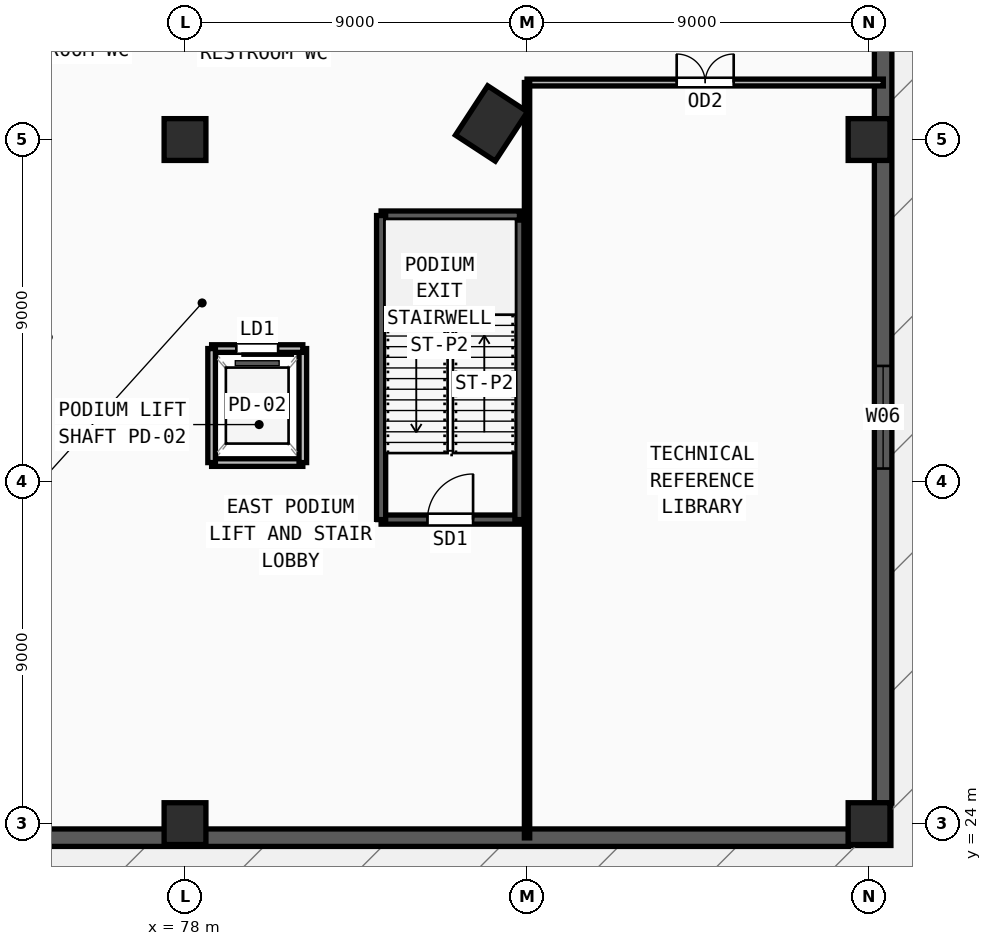
"""IFC4 building model, lengths in metres.
Left out: names, types, materials, properties, quantities, classifications, styles, units other than length and angle.
Written with IfcOpenShell. Run it as: python <this file> out.ifc"""

import sys

from ifc_helpers import new_model, si_unit, direction, frame, frame_2d, origin, origin_2d, place, context, subcontext, project, spatial, rectangle, extrude, source, transform, mapped, element, fill, save


model = new_model("IFC4")
c1 = context("Model", 3, precision=1e-05, world=origin(), true_north=direction((0.0, 1.0)))
c2 = subcontext(c1, "Body", "Model", "MODEL_VIEW")
j1 = project(units=[si_unit("LENGTHUNIT", "METRE"), si_unit("PLANEANGLEUNIT", "RADIAN")], contexts=[c1])
p1 = place(None, origin())
s1 = spatial("IfcSite", under=j1, at=p1, CompositionType="ELEMENT")
p2 = place(p1, origin())
s2 = spatial("IfcBuilding", under=s1, at=p2, CompositionType="ELEMENT")
p3 = place(p2, frame((0.0, 0.0, 18.9)))
s3 = spatial("IfcBuildingStorey", under=s2, at=p3, CompositionType="ELEMENT", Elevation=18.9)
m1 = source(origin(), c2, "Body", "SweptSolid", [
    extrude(rectangle(XDim=1.55, YDim=1.25, at=origin_2d()), origin(), (0.0, 0.0, 1.0), 4.5),
])
p4 = place(p3, frame((86.064, 42.423, 0.0), z_axis=(0.0, 0.0, 1.0), x_axis=(0.546978918409, 0.837146380758, 0.0)))
e1 = element("IfcColumn", 1, at=p4, inside=s3, PredefinedType="COLUMN", context=c2, shape_type="MappedRepresentation", body=[
    mapped(m1, transform((0.0, 0.0, 0.0), x_axis=(1.0, 0.0, 0.0), y_axis=(0.0, 1.0, 0.0), z_axis=(0.0, 0.0, 1.0), scale=1.0)),
])
m2 = source(origin(), c2, "Body", "SweptSolid", [
    extrude(rectangle(XDim=1.1, YDim=1.1, at=origin_2d()), origin(), (0.0, 0.0, 1.0), 4.5),
])
for number, where, z_axis, x_axis in (
    (2, (78.0, 24.0, 0.0), (0.0, 0.0, 1.0), (1.0, 0.0, 0.0)),
    (3, (96.0, 24.0, 0.0), (0.0, 0.0, 1.0), (1.0, 0.0, 0.0)),
    (4, (78.0, 42.0, 0.0), (0.0, 0.0, 1.0), (1.0, 0.0, 0.0)),
    (5, (96.0, 42.0, 0.0), (0.0, 0.0, 1.0), (1.0, 0.0, 0.0)),
):
    element("IfcColumn", number, at=place(p3, frame(where, z_axis=z_axis, x_axis=x_axis)), inside=s3, PredefinedType="COLUMN", context=c2, shape_type="MappedRepresentation", body=[
        mapped(m2, transform((0.0, 0.0, 0.0), x_axis=(1.0, 0.0, 0.0), y_axis=(0.0, 1.0, 0.0), z_axis=(0.0, 0.0, 1.0), scale=1.0)),
    ])
p5 = place(p3, frame((96.37, 24.54, 0.0), z_axis=(0.0, 0.0, 1.0), x_axis=(0.0, 1.0, 0.0)))
e6 = element("IfcWall", 6, at=p5, inside=s3, PredefinedType="SOLIDWALL", context=c2, shape_type="SweptSolid", body=[
    extrude(rectangle(XDim=60.92, YDim=0.46, at=frame_2d((30.46, 0.0))), origin(), (0.0, 0.0, 1.0), 3.6),
])
m3 = source(origin(), c2, "Body", "SweptSolid", [
    extrude(rectangle(XDim=2.7, YDim=2.35, at=frame_2d((1.35, 1.175))), frame((0.0, 0.24, 0.0), z_axis=(0.0, -1.0, 0.0), x_axis=(1.0, 0.0, 0.0)), (0.0, 0.0, 1.0), 0.48),
])
p6 = place(p5, frame((8.803, 0.0, 0.55)))
e7 = element("IfcOpeningElement", 7, at=p6, cuts=e6, PredefinedType="OPENING", context=c2, shape_type="MappedRepresentation", body=[
    mapped(m3, transform((0.0, 0.0, 0.0), x_axis=(1.0, 0.0, 0.0), y_axis=(0.0, 1.0, 0.0), z_axis=(0.0, 0.0, 1.0), scale=1.0)),
])
p7 = place(p5, frame((29.11, 0.0, 0.55)))
e8 = element("IfcOpeningElement", 8, at=p7, cuts=e6, PredefinedType="OPENING", context=c2, shape_type="MappedRepresentation", body=[
    mapped(m3, transform((0.0, 0.0, 0.0), x_axis=(1.0, 0.0, 0.0), y_axis=(0.0, 1.0, 0.0), z_axis=(0.0, 0.0, 1.0), scale=1.0)),
])
p8 = place(p5, frame((39.263, 0.0, 0.55)))
e9 = element("IfcOpeningElement", 9, at=p8, cuts=e6, PredefinedType="OPENING", context=c2, shape_type="MappedRepresentation", body=[
    mapped(m3, transform((0.0, 0.0, 0.0), x_axis=(1.0, 0.0, 0.0), y_axis=(0.0, 1.0, 0.0), z_axis=(0.0, 0.0, 1.0), scale=1.0)),
])
p9 = place(p5, frame((49.417, 0.0, 0.55)))
e10 = element("IfcOpeningElement", 10, at=p9, cuts=e6, PredefinedType="OPENING", context=c2, shape_type="MappedRepresentation", body=[
    mapped(m3, transform((0.0, 0.0, 0.0), x_axis=(1.0, 0.0, 0.0), y_axis=(0.0, 1.0, 0.0), z_axis=(0.0, 0.0, 1.0), scale=1.0)),
])
p10 = place(p3, frame((24.54, 23.63, 0.0), z_axis=(0.0, 0.0, 1.0), x_axis=(1.0, 0.0, 0.0)))
e11 = element("IfcWall", 11, at=p10, inside=s3, PredefinedType="SOLIDWALL", context=c2, shape_type="SweptSolid", body=[
    extrude(rectangle(XDim=70.92, YDim=0.46, at=frame_2d((35.46, 0.0))), origin(), (0.0, 0.0, 1.0), 3.6),
])
m4 = source(origin(), c2, "Body", "SweptSolid", [
    extrude(rectangle(XDim=1.8, YDim=2.3, at=frame_2d((0.9, 1.15))), frame((0.0, 0.24, 0.0), z_axis=(0.0, -1.0, 0.0), x_axis=(1.0, 0.0, 0.0)), (0.0, 0.0, 1.0), 0.48),
])
p11 = place(p10, frame((28.06, 0.0, 0.0)))
e12 = element("IfcOpeningElement", 12, at=p11, cuts=e11, PredefinedType="OPENING", context=c2, shape_type="MappedRepresentation", body=[
    mapped(m4, transform((0.0, 0.0, 0.0), x_axis=(1.0, 0.0, 0.0), y_axis=(0.0, 1.0, 0.0), z_axis=(0.0, 0.0, 1.0), scale=1.0)),
])
p12 = place(p10, frame((41.06, 0.0, 0.0)))
e13 = element("IfcOpeningElement", 13, at=p12, cuts=e11, PredefinedType="OPENING", context=c2, shape_type="MappedRepresentation", body=[
    mapped(m4, transform((0.0, 0.0, 0.0), x_axis=(1.0, 0.0, 0.0), y_axis=(0.0, 1.0, 0.0), z_axis=(0.0, 0.0, 1.0), scale=1.0)),
])
p13 = place(p3, frame((83.16, 32.0, 0.0), z_axis=(0.0, 0.0, 1.0), x_axis=(1.0, 0.0, 0.0)))
e14 = element("IfcWall", 14, at=p13, inside=s3, PredefinedType="SOLIDWALL", context=c2, shape_type="SweptSolid", body=[
    extrude(rectangle(XDim=3.64, YDim=0.24, at=frame_2d((1.82, 0.0))), origin(), (0.0, 0.0, 1.0), 3.6),
])
m5 = source(origin(), c2, "Body", "SweptSolid", [
    extrude(rectangle(XDim=1.2, YDim=2.2, at=frame_2d((0.6, 1.1))), frame((0.0, 0.13, 0.0), z_axis=(0.0, -1.0, 0.0), x_axis=(1.0, 0.0, 0.0)), (0.0, 0.0, 1.0), 0.26),
])
p14 = place(p13, frame((1.22, 0.0, 0.0)))
e15 = element("IfcOpeningElement", 15, at=p14, cuts=e14, PredefinedType="OPENING", context=c2, shape_type="MappedRepresentation", body=[
    mapped(m5, transform((0.0, 0.0, 0.0), x_axis=(1.0, 0.0, 0.0), y_axis=(0.0, 1.0, 0.0), z_axis=(0.0, 0.0, 1.0), scale=1.0)),
])
p15 = place(p3, frame((86.8, 32.0, 0.0), z_axis=(0.0, 0.0, 1.0), x_axis=(0.0, 1.0, 0.0)))
e16 = element("IfcWall", 16, at=p15, inside=s3, PredefinedType="SOLIDWALL", context=c2, shape_type="SweptSolid", body=[
    extrude(rectangle(XDim=8.0, YDim=0.24, at=frame_2d((4.0, 0.0))), origin(), (0.0, 0.0, 1.0), 3.6),
])
p16 = place(p3, frame((86.8, 40.0, 0.0), z_axis=(0.0, 0.0, 1.0), x_axis=(-1.0, 0.0, 0.0)))
e17 = element("IfcWall", 17, at=p16, inside=s3, PredefinedType="SOLIDWALL", context=c2, shape_type="SweptSolid", body=[
    extrude(rectangle(XDim=3.64, YDim=0.24, at=frame_2d((1.82, 0.0))), origin(), (0.0, 0.0, 1.0), 3.6),
])
p17 = place(p3, frame((83.16, 40.0, 0.0), z_axis=(0.0, 0.0, 1.0), x_axis=(0.0, -1.0, 0.0)))
e18 = element("IfcWall", 18, at=p17, inside=s3, PredefinedType="SOLIDWALL", context=c2, shape_type="SweptSolid", body=[
    extrude(rectangle(XDim=8.0, YDim=0.24, at=frame_2d((4.0, 0.0))), origin(), (0.0, 0.0, 1.0), 3.6),
])
p18 = place(p3, frame((78.7, 33.5, 0.0), z_axis=(0.0, 0.0, 1.0), x_axis=(1.0, 0.0, 0.0)))
e19 = element("IfcWall", 19, at=p18, inside=s3, PredefinedType="SOLIDWALL", context=c2, shape_type="SweptSolid", body=[
    extrude(rectangle(XDim=2.4, YDim=0.2, at=frame_2d((1.2, 0.0))), origin(), (0.0, 0.0, 1.0), 3.6),
])
p19 = place(p3, frame((81.1, 33.5, 0.0), z_axis=(0.0, 0.0, 1.0), x_axis=(0.0, 1.0, 0.0)))
e20 = element("IfcWall", 20, at=p19, inside=s3, PredefinedType="SOLIDWALL", context=c2, shape_type="SweptSolid", body=[
    extrude(rectangle(XDim=3.0, YDim=0.2, at=frame_2d((1.5, 0.0))), origin(), (0.0, 0.0, 1.0), 3.6),
])
p20 = place(p3, frame((81.1, 36.5, 0.0), z_axis=(0.0, 0.0, 1.0), x_axis=(-1.0, 0.0, 0.0)))
e21 = element("IfcWall", 21, at=p20, inside=s3, PredefinedType="SOLIDWALL", context=c2, shape_type="SweptSolid", body=[
    extrude(rectangle(XDim=2.4, YDim=0.2, at=frame_2d((1.2, 0.0))), origin(), (0.0, 0.0, 1.0), 3.6),
])
m6 = source(origin(), c2, "Body", "SweptSolid", [
    extrude(rectangle(XDim=1.1, YDim=2.2, at=frame_2d((0.55, 1.1))), frame((0.0, 0.11, 0.0), z_axis=(0.0, -1.0, 0.0), x_axis=(1.0, 0.0, 0.0)), (0.0, 0.0, 1.0), 0.22),
])
p21 = place(p20, frame((0.65, 0.0, 0.0)))
e22 = element("IfcOpeningElement", 22, at=p21, cuts=e21, PredefinedType="OPENING", context=c2, shape_type="MappedRepresentation", body=[
    mapped(m6, transform((0.0, 0.0, 0.0), x_axis=(1.0, 0.0, 0.0), y_axis=(0.0, 1.0, 0.0), z_axis=(0.0, 0.0, 1.0), scale=1.0)),
])
p22 = place(p3, frame((78.7, 36.5, 0.0), z_axis=(0.0, 0.0, 1.0), x_axis=(0.0, -1.0, 0.0)))
e23 = element("IfcWall", 23, at=p22, inside=s3, PredefinedType="SOLIDWALL", context=c2, shape_type="SweptSolid", body=[
    extrude(rectangle(XDim=3.0, YDim=0.2, at=frame_2d((1.5, 0.0))), origin(), (0.0, 0.0, 1.0), 3.6),
])
p23 = place(p3, frame((87.0, 43.5, 0.0), z_axis=(0.0, 0.0, 1.0), x_axis=(1.0, 0.0, 0.0)))
e24 = element("IfcWall", 24, at=p23, inside=s3, PredefinedType="PARTITIONING", context=c2, shape_type="SweptSolid", body=[
    extrude(rectangle(XDim=9.375, YDim=0.18, at=frame_2d((4.688, 0.0))), origin(), (0.0, 0.0, 1.0), 3.6),
])
m7 = source(origin(), c2, "Body", "SweptSolid", [
    extrude(rectangle(XDim=1.5, YDim=2.2, at=frame_2d((0.75, 1.1))), frame((0.0, 0.1, 0.0), z_axis=(0.0, -1.0, 0.0), x_axis=(1.0, 0.0, 0.0)), (0.0, 0.0, 1.0), 0.2),
])
p24 = place(p23, frame((3.938, 0.0, 0.0)))
e25 = element("IfcOpeningElement", 25, at=p24, cuts=e24, PredefinedType="OPENING", context=c2, shape_type="MappedRepresentation", body=[
    mapped(m7, transform((0.0, 0.0, 0.0), x_axis=(1.0, 0.0, 0.0), y_axis=(0.0, 1.0, 0.0), z_axis=(0.0, 0.0, 1.0), scale=1.0)),
])
p25 = place(p3, frame((87.0, 23.625, 0.0), z_axis=(0.0, 0.0, 1.0), x_axis=(0.0, 1.0, 0.0)))
e26 = element("IfcWall", 26, at=p25, inside=s3, PredefinedType="PARTITIONING", context=c2, shape_type="SweptSolid", body=[
    extrude(rectangle(XDim=19.875, YDim=0.14, at=frame_2d((9.938, 0.0))), origin(), (0.0, 0.0, 1.0), 3.6),
])
m8 = source(origin(), c2, "Body", "SweptSolid", [
    extrude(rectangle(XDim=2.7, YDim=2.35, at=frame_2d((1.35, 1.175))), frame((0.0, 0.03, 0.0), z_axis=(0.0, -1.0, 0.0), x_axis=(1.0, 0.0, 0.0)), (0.0, 0.0, 1.0), 0.06),
])
p26 = place(p6, origin())
e27 = element("IfcWindow", 27, at=p26, inside=s3, PartitioningType="TRIPLE_PANEL_VERTICAL", PredefinedType="WINDOW", context=c2, shape_type="MappedRepresentation", body=[
    mapped(m8, transform((0.0, 0.0, 0.0), x_axis=(1.0, 0.0, 0.0), y_axis=(0.0, 1.0, 0.0), z_axis=(0.0, 0.0, 1.0), scale=1.0)),
])
fill(e7, e27)
m9 = source(origin(), c2, "Body", "SweptSolid", [
    extrude(rectangle(XDim=1.2, YDim=2.2, at=frame_2d((0.6, 1.1))), frame((0.0, 0.025, 0.0), z_axis=(0.0, -1.0, 0.0), x_axis=(1.0, 0.0, 0.0)), (0.0, 0.0, 1.0), 0.05),
])
p27 = place(p14, origin())
e28 = element("IfcDoor", 28, at=p27, inside=s3, OperationType="SINGLE_SWING_RIGHT", PredefinedType="DOOR", context=c2, shape_type="MappedRepresentation", body=[
    mapped(m9, transform((0.0, 0.0, 0.0), x_axis=(1.0, 0.0, 0.0), y_axis=(0.0, 1.0, 0.0), z_axis=(0.0, 0.0, 1.0), scale=1.0)),
])
fill(e15, e28)
m10 = source(origin(), c2, "Body", "SweptSolid", [
    extrude(rectangle(XDim=1.1, YDim=2.2, at=frame_2d((0.55, 1.1))), frame((0.0, 0.025, 0.0), z_axis=(0.0, -1.0, 0.0), x_axis=(1.0, 0.0, 0.0)), (0.0, 0.0, 1.0), 0.05),
])
p28 = place(p21, origin())
e29 = element("IfcDoor", 29, at=p28, inside=s3, OperationType="SLIDING_TO_LEFT", PredefinedType="DOOR", context=c2, shape_type="MappedRepresentation", body=[
    mapped(m10, transform((0.0, 0.0, 0.0), x_axis=(1.0, 0.0, 0.0), y_axis=(0.0, 1.0, 0.0), z_axis=(0.0, 0.0, 1.0), scale=1.0)),
])
fill(e22, e29)
m11 = source(origin(), c2, "Body", "SweptSolid", [
    extrude(rectangle(XDim=1.5, YDim=2.2, at=frame_2d((0.75, 1.1))), frame((0.0, 0.025, 0.0), z_axis=(0.0, -1.0, 0.0), x_axis=(1.0, 0.0, 0.0)), (0.0, 0.0, 1.0), 0.05),
])
p29 = place(p24, origin())
e30 = element("IfcDoor", 30, at=p29, inside=s3, OperationType="DOUBLE_DOOR_SINGLE_SWING", PredefinedType="DOOR", context=c2, shape_type="MappedRepresentation", body=[
    mapped(m11, transform((0.0, 0.0, 0.0), x_axis=(1.0, 0.0, 0.0), y_axis=(0.0, 1.0, 0.0), z_axis=(0.0, 0.0, 1.0), scale=1.0)),
])
fill(e25, e30)
save(model, sys.argv[1])
